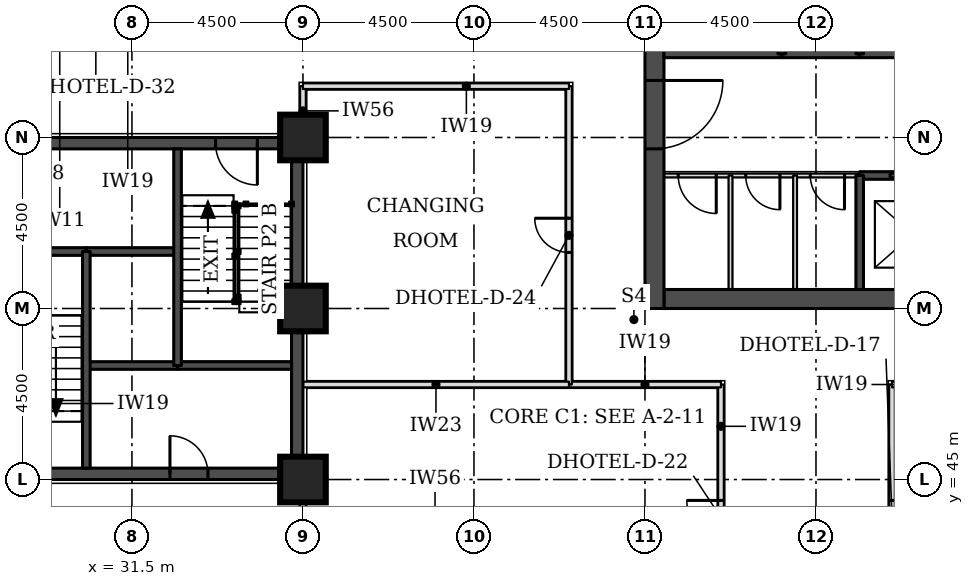
"""IFC4 building model, lengths in metres.
Left out: names, types, materials, properties, quantities, classifications, styles, units other than length and angle.
Written with IfcOpenShell. Run it as: python <this file> out.ifc"""

import sys

from ifc_helpers import new_model, si_unit, direction, frame, frame_2d, origin, origin_2d, place, context, subcontext, project, spatial, rectangle, extrude, element, fill, save


model = new_model("IFC4")
c1 = context("Model", 3, precision=1e-05, world=origin(), true_north=direction((0.0, 1.0)))
c2 = subcontext(c1, "Body", "Model", "MODEL_VIEW")
j1 = project(units=[si_unit("LENGTHUNIT", "METRE"), si_unit("PLANEANGLEUNIT", "RADIAN")], contexts=[c1])
p1 = place(None, origin())
s1 = spatial("IfcSite", under=j1, at=p1, CompositionType="ELEMENT")
p2 = place(p1, origin())
s2 = spatial("IfcBuilding", under=s1, at=p2, CompositionType="ELEMENT")
p3 = place(p2, frame((0.0, 0.0, 36.3)))
s3 = spatial("IfcBuildingStorey", under=s2, at=p3, CompositionType="ELEMENT", Elevation=36.3)
for number, where, z_axis, x_axis in (
    (1, (36.0, 45.0, 0.0), (0.0, 0.0, 1.0), (1.0, 0.0, 0.0)),
    (2, (36.0, 49.5, 0.0), (0.0, 0.0, 1.0), (1.0, 0.0, 0.0)),
    (3, (36.0, 54.0, 0.0), (0.0, 0.0, 1.0), (1.0, 0.0, 0.0)),
):
    element("IfcColumn", number, at=place(p3, frame(where, z_axis=z_axis, x_axis=x_axis)), inside=s3, PredefinedType="COLUMN", context=c2, shape_type="SweptSolid", body=[
        extrude(rectangle(XDim=1.2, YDim=1.2, at=origin_2d()), origin(), (0.0, 0.0, 1.0), 3.3),
    ])
p4 = place(p3, frame((45.5, 49.75, 0.0), z_axis=(0.0, 0.0, 1.0), x_axis=(1.0, 0.0, 0.0)))
e4 = element("IfcWall", 4, at=p4, inside=s3, PredefinedType="SHEAR", context=c2, shape_type="SweptSolid", body=[
    extrude(rectangle(XDim=21.5, YDim=0.5, at=frame_2d((10.75, 0.0))), origin(), (0.0, 0.0, 1.0), 3.3),
])
p5 = place(p3, frame((45.25, 49.5, 0.0), z_axis=(0.0, 0.0, 1.0), x_axis=(0.0, 1.0, 0.0)))
e5 = element("IfcWall", 5, at=p5, inside=s3, PredefinedType="SHEAR", context=c2, shape_type="SweptSolid", body=[
    extrude(rectangle(XDim=22.5, YDim=0.5, at=frame_2d((11.25, 0.0))), origin(), (0.0, 0.0, 1.0), 3.3),
])
p6 = place(p5, frame((4.2, 0.0, 0.0)))
e6 = element("IfcOpeningElement", 6, at=p6, cuts=e5, PredefinedType="OPENING", context=c2, shape_type="SweptSolid", body=[
    extrude(rectangle(XDim=1.8, YDim=2.1, at=frame_2d((0.9, 1.05))), frame((0.0, 0.26, 0.0), z_axis=(0.0, -1.0, 0.0), x_axis=(1.0, 0.0, 0.0)), (0.0, 0.0, 1.0), 0.52),
])
p7 = place(p5, frame((6.9, 0.0, 0.0)))
e7 = element("IfcOpeningElement", 7, at=p7, cuts=e5, PredefinedType="OPENING", context=c2, shape_type="SweptSolid", body=[
    extrude(rectangle(XDim=1.1, YDim=2.1, at=frame_2d((0.55, 1.05))), frame((0.0, 0.26, 0.0), z_axis=(0.0, -1.0, 0.0), x_axis=(1.0, 0.0, 0.0)), (0.0, 0.0, 1.0), 0.52),
])
p8 = place(p5, frame((13.6, 0.0, 0.0)))
e8 = element("IfcOpeningElement", 8, at=p8, cuts=e5, PredefinedType="OPENING", context=c2, shape_type="SweptSolid", body=[
    extrude(rectangle(XDim=1.1, YDim=2.1, at=frame_2d((0.55, 1.05))), frame((0.0, 0.26, 0.0), z_axis=(0.0, -1.0, 0.0), x_axis=(1.0, 0.0, 0.0)), (0.0, 0.0, 1.0), 0.52),
])
p9 = place(p5, frame((16.5, 0.0, 0.0)))
e9 = element("IfcOpeningElement", 9, at=p9, cuts=e5, PredefinedType="OPENING", context=c2, shape_type="SweptSolid", body=[
    extrude(rectangle(XDim=1.8, YDim=2.1, at=frame_2d((0.9, 1.05))), frame((0.0, 0.26, 0.0), z_axis=(0.0, -1.0, 0.0), x_axis=(1.0, 0.0, 0.0)), (0.0, 0.0, 1.0), 0.52),
])
p10 = place(p3, frame((27.3, 45.15, 0.0), z_axis=(0.0, 0.0, 1.0), x_axis=(1.0, 0.0, 0.0)))
e10 = element("IfcWall", 10, at=p10, inside=s3, PredefinedType="SHEAR", context=c2, shape_type="SweptSolid", body=[
    extrude(rectangle(XDim=8.4, YDim=0.3, at=frame_2d((4.2, 0.0))), origin(), (0.0, 0.0, 1.0), 3.3),
])
p11 = place(p10, frame((5.2, 0.0, 0.0)))
e11 = element("IfcOpeningElement", 11, at=p11, cuts=e10, PredefinedType="OPENING", context=c2, shape_type="SweptSolid", body=[
    extrude(rectangle(XDim=1.0, YDim=2.1, at=frame_2d((0.5, 1.05))), frame((0.0, 0.16, 0.0), z_axis=(0.0, -1.0, 0.0), x_axis=(1.0, 0.0, 0.0)), (0.0, 0.0, 1.0), 0.32),
])
p12 = place(p3, frame((27.3, 53.85, 0.0), z_axis=(0.0, 0.0, 1.0), x_axis=(1.0, 0.0, 0.0)))
e12 = element("IfcWall", 12, at=p12, inside=s3, PredefinedType="SHEAR", context=c2, shape_type="SweptSolid", body=[
    extrude(rectangle(XDim=8.4, YDim=0.3, at=frame_2d((4.2, 0.0))), origin(), (0.0, 0.0, 1.0), 3.3),
])
p13 = place(p12, frame((6.4, 0.0, 0.0)))
e13 = element("IfcOpeningElement", 13, at=p13, cuts=e12, PredefinedType="OPENING", context=c2, shape_type="SweptSolid", body=[
    extrude(rectangle(XDim=1.1, YDim=2.1, at=frame_2d((0.55, 1.05))), frame((0.0, 0.16, 0.0), z_axis=(0.0, -1.0, 0.0), x_axis=(1.0, 0.0, 0.0)), (0.0, 0.0, 1.0), 0.32),
])
p14 = place(p3, frame((35.85, 45.0, 0.0), z_axis=(0.0, 0.0, 1.0), x_axis=(0.0, 1.0, 0.0)))
e14 = element("IfcWall", 14, at=p14, inside=s3, PredefinedType="SHEAR", context=c2, shape_type="SweptSolid", body=[
    extrude(rectangle(XDim=9.0, YDim=0.3, at=frame_2d((4.5, 0.0))), origin(), (0.0, 0.0, 1.0), 3.3),
])
p15 = place(p3, frame((51.5, 25.15, 0.0), z_axis=(0.0, 0.0, 1.0), x_axis=(0.0, 1.0, 0.0)))
e15 = element("IfcWall", 15, at=p15, inside=s3, PredefinedType="PARTITIONING", context=c2, shape_type="SweptSolid", body=[
    extrude(rectangle(XDim=22.35, YDim=0.15, at=frame_2d((11.175, 0.0))), origin(), (0.0, 0.0, 1.0), 3.08),
])
p16 = place(p15, frame((0.347, 0.0, 0.0)))
e16 = element("IfcOpeningElement", 16, at=p16, cuts=e15, PredefinedType="OPENING", context=c2, shape_type="SweptSolid", body=[
    extrude(rectangle(XDim=1.0, YDim=2.1, at=frame_2d((0.5, 1.05))), frame((0.0, 0.085, 0.0), z_axis=(0.0, -1.0, 0.0), x_axis=(1.0, 0.0, 0.0)), (0.0, 0.0, 1.0), 0.17),
])
p17 = place(p15, frame((2.3, 0.0, 0.0)))
e17 = element("IfcOpeningElement", 17, at=p17, cuts=e15, PredefinedType="OPENING", context=c2, shape_type="SweptSolid", body=[
    extrude(rectangle(XDim=1.0, YDim=2.1, at=frame_2d((0.5, 1.05))), frame((0.0, 0.085, 0.0), z_axis=(0.0, -1.0, 0.0), x_axis=(1.0, 0.0, 0.0)), (0.0, 0.0, 1.0), 0.17),
])
p18 = place(p15, frame((9.15, 0.0, 0.0)))
e18 = element("IfcOpeningElement", 18, at=p18, cuts=e15, PredefinedType="OPENING", context=c2, shape_type="SweptSolid", body=[
    extrude(rectangle(XDim=1.0, YDim=2.1, at=frame_2d((0.5, 1.05))), frame((0.0, 0.085, 0.0), z_axis=(0.0, -1.0, 0.0), x_axis=(1.0, 0.0, 0.0)), (0.0, 0.0, 1.0), 0.17),
])
p19 = place(p15, frame((11.3, 0.0, 0.0)))
e19 = element("IfcOpeningElement", 19, at=p19, cuts=e15, PredefinedType="OPENING", context=c2, shape_type="SweptSolid", body=[
    extrude(rectangle(XDim=1.0, YDim=2.1, at=frame_2d((0.5, 1.05))), frame((0.0, 0.085, 0.0), z_axis=(0.0, -1.0, 0.0), x_axis=(1.0, 0.0, 0.0)), (0.0, 0.0, 1.0), 0.17),
])
p20 = place(p15, frame((18.4, 0.0, 0.0)))
e20 = element("IfcOpeningElement", 20, at=p20, cuts=e15, PredefinedType="OPENING", context=c2, shape_type="SweptSolid", body=[
    extrude(rectangle(XDim=0.9, YDim=2.1, at=frame_2d((0.45, 1.05))), frame((0.0, 0.085, 0.0), z_axis=(0.0, -1.0, 0.0), x_axis=(1.0, 0.0, 0.0)), (0.0, 0.0, 1.0), 0.17),
])
p21 = place(p3, frame((36.0, 40.55, 0.0), z_axis=(0.0, 0.0, 1.0), x_axis=(0.0, 1.0, 0.0)))
e21 = element("IfcWall", 21, at=p21, inside=s3, PredefinedType="PARTITIONING", context=c2, shape_type="SweptSolid", body=[
    extrude(rectangle(XDim=4.4, YDim=0.15, at=frame_2d((2.2, 0.0))), origin(), (0.0, 0.0, 1.0), 2.33),
])
p22 = place(p3, frame((47.0, 40.5, 0.0), z_axis=(0.0, 0.0, 1.0), x_axis=(0.0, 1.0, 0.0)))
e22 = element("IfcWall", 22, at=p22, inside=s3, PredefinedType="PARTITIONING", context=c2, shape_type="SweptSolid", body=[
    extrude(rectangle(XDim=7.0, YDim=0.15, at=frame_2d((3.5, 0.0))), origin(), (0.0, 0.0, 1.0), 3.08),
])
p23 = place(p22, frame((3.05, 0.0, 0.0)))
e23 = element("IfcOpeningElement", 23, at=p23, cuts=e22, PredefinedType="OPENING", context=c2, shape_type="SweptSolid", body=[
    extrude(rectangle(XDim=0.9, YDim=2.1, at=frame_2d((0.45, 1.05))), frame((0.0, 0.085, 0.0), z_axis=(0.0, -1.0, 0.0), x_axis=(1.0, 0.0, 0.0)), (0.0, 0.0, 1.0), 0.17),
])
p24 = place(p3, frame((43.0, 47.5, 0.0), z_axis=(0.0, 0.0, 1.0), x_axis=(1.0, 0.0, 0.0)))
e24 = element("IfcWall", 24, at=p24, inside=s3, PredefinedType="PARTITIONING", context=c2, shape_type="SweptSolid", body=[
    extrude(rectangle(XDim=4.0, YDim=0.15, at=frame_2d((2.0, 0.0))), origin(), (0.0, 0.0, 1.0), 3.08),
])
p25 = place(p3, frame((43.0, 47.5, 0.0), z_axis=(0.0, 0.0, 1.0), x_axis=(0.0, 1.0, 0.0)))
e25 = element("IfcWall", 25, at=p25, inside=s3, PredefinedType="PARTITIONING", context=c2, shape_type="SweptSolid", body=[
    extrude(rectangle(XDim=7.85, YDim=0.15, at=frame_2d((3.925, 0.0))), origin(), (0.0, 0.0, 1.0), 3.08),
])
p26 = place(p25, frame((3.475, 0.0, 0.0)))
e26 = element("IfcOpeningElement", 26, at=p26, cuts=e25, PredefinedType="OPENING", context=c2, shape_type="SweptSolid", body=[
    extrude(rectangle(XDim=0.9, YDim=2.1, at=frame_2d((0.45, 1.05))), frame((0.0, 0.085, 0.0), z_axis=(0.0, -1.0, 0.0), x_axis=(1.0, 0.0, 0.0)), (0.0, 0.0, 1.0), 0.17),
])
p27 = place(p3, frame((51.5, 47.5, 0.0), z_axis=(0.0, 0.0, 1.0), x_axis=(1.0, 0.0, 0.0)))
e27 = element("IfcWall", 27, at=p27, inside=s3, PredefinedType="PARTITIONING", context=c2, shape_type="SweptSolid", body=[
    extrude(rectangle(XDim=18.0, YDim=0.15, at=frame_2d((9.0, 0.0))), origin(), (0.0, 0.0, 1.0), 3.08),
])
p28 = place(p27, frame((12.2, 0.0, 0.0)))
e28 = element("IfcOpeningElement", 28, at=p28, cuts=e27, PredefinedType="OPENING", context=c2, shape_type="SweptSolid", body=[
    extrude(rectangle(XDim=1.0, YDim=2.1, at=frame_2d((0.5, 1.05))), frame((0.0, 0.085, 0.0), z_axis=(0.0, -1.0, 0.0), x_axis=(1.0, 0.0, 0.0)), (0.0, 0.0, 1.0), 0.17),
])
p29 = place(p27, frame((10.05, 0.0, 0.0)))
e29 = element("IfcOpeningElement", 29, at=p29, cuts=e27, PredefinedType="OPENING", context=c2, shape_type="SweptSolid", body=[
    extrude(rectangle(XDim=1.0, YDim=2.1, at=frame_2d((0.5, 1.05))), frame((0.0, 0.085, 0.0), z_axis=(0.0, -1.0, 0.0), x_axis=(1.0, 0.0, 0.0)), (0.0, 0.0, 1.0), 0.17),
])
p30 = place(p27, frame((16.5, 0.0, 0.0)))
e30 = element("IfcOpeningElement", 30, at=p30, cuts=e27, PredefinedType="OPENING", context=c2, shape_type="SweptSolid", body=[
    extrude(rectangle(XDim=1.0, YDim=2.1, at=frame_2d((0.5, 1.05))), frame((0.0, 0.085, 0.0), z_axis=(0.0, -1.0, 0.0), x_axis=(1.0, 0.0, 0.0)), (0.0, 0.0, 1.0), 0.17),
])
p31 = place(p3, frame((36.0, 54.05, 0.0), z_axis=(0.0, 0.0, 1.0), x_axis=(0.0, 1.0, 0.0)))
e31 = element("IfcWall", 31, at=p31, inside=s3, PredefinedType="PARTITIONING", context=c2, shape_type="SweptSolid", body=[
    extrude(rectangle(XDim=1.3, YDim=0.15, at=frame_2d((0.65, 0.0))), origin(), (0.0, 0.0, 1.0), 2.33),
])
for number, where, z_axis, x_axis in (
    (32, (36.0, 55.35, 0.0), (0.0, 0.0, 1.0), (1.0, 0.0, 0.0)),
    (33, (36.0, 47.5, 0.0), (0.0, 0.0, 1.0), (1.0, 0.0, 0.0)),
):
    element("IfcWall", number, at=place(p3, frame(where, z_axis=z_axis, x_axis=x_axis)), inside=s3, PredefinedType="PARTITIONING", context=c2, shape_type="SweptSolid", body=[
        extrude(rectangle(XDim=7.0, YDim=0.15, at=frame_2d((3.5, 0.0))), origin(), (0.0, 0.0, 1.0), 3.08),
    ])
p32 = place(p3, frame((45.5, 53.0, 0.0), z_axis=(0.0, 0.0, 1.0), x_axis=(1.0, 0.0, 0.0)))
e34 = element("IfcWall", 34, at=p32, inside=s3, PredefinedType="PARTITIONING", context=c2, shape_type="SweptSolid", body=[
    extrude(rectangle(XDim=5.15, YDim=0.1, at=frame_2d((2.575, 0.0))), origin(), (0.0, 0.0, 1.0), 3.08),
])
p33 = place(p32, frame((0.375, 0.0, 0.0)))
e35 = element("IfcOpeningElement", 35, at=p33, cuts=e34, PredefinedType="OPENING", context=c2, shape_type="SweptSolid", body=[
    extrude(rectangle(XDim=1.0, YDim=2.1, at=frame_2d((0.5, 1.05))), frame((0.0, 0.06, 0.0), z_axis=(0.0, -1.0, 0.0), x_axis=(1.0, 0.0, 0.0)), (0.0, 0.0, 1.0), 0.12),
])
p34 = place(p32, frame((2.151, 0.0, 0.0)))
e36 = element("IfcOpeningElement", 36, at=p34, cuts=e34, PredefinedType="OPENING", context=c2, shape_type="SweptSolid", body=[
    extrude(rectangle(XDim=0.9, YDim=2.1, at=frame_2d((0.45, 1.05))), frame((0.0, 0.06, 0.0), z_axis=(0.0, -1.0, 0.0), x_axis=(1.0, 0.0, 0.0)), (0.0, 0.0, 1.0), 0.12),
])
p35 = place(p32, frame((3.85, 0.0, 0.0)))
e37 = element("IfcOpeningElement", 37, at=p35, cuts=e34, PredefinedType="OPENING", context=c2, shape_type="SweptSolid", body=[
    extrude(rectangle(XDim=0.9, YDim=2.1, at=frame_2d((0.45, 1.05))), frame((0.0, 0.06, 0.0), z_axis=(0.0, -1.0, 0.0), x_axis=(1.0, 0.0, 0.0)), (0.0, 0.0, 1.0), 0.12),
])
p36 = place(p3, frame((50.65, 53.0, 0.0), z_axis=(0.0, 0.0, 1.0), x_axis=(1.0, 0.0, 0.0)))
e38 = element("IfcWall", 38, at=p36, inside=s3, PredefinedType="SOLIDWALL", context=c2, shape_type="SweptSolid", body=[
    extrude(rectangle(XDim=11.2, YDim=0.2, at=frame_2d((5.6, 0.0))), origin(), (0.0, 0.0, 1.0), 3.08),
])
p37 = place(p36, frame((0.8, 0.0, 0.0)))
e39 = element("IfcOpeningElement", 39, at=p37, cuts=e38, PredefinedType="OPENING", context=c2, shape_type="SweptSolid", body=[
    extrude(rectangle(XDim=1.2, YDim=2.1, at=frame_2d((0.6, 1.05))), frame((0.0, 0.11, 0.0), z_axis=(0.0, -1.0, 0.0), x_axis=(1.0, 0.0, 0.0)), (0.0, 0.0, 1.0), 0.22),
])
p38 = place(p36, frame((3.6, 0.0, 0.0)))
e40 = element("IfcOpeningElement", 40, at=p38, cuts=e38, PredefinedType="OPENING", context=c2, shape_type="SweptSolid", body=[
    extrude(rectangle(XDim=1.2, YDim=2.1, at=frame_2d((0.6, 1.05))), frame((0.0, 0.11, 0.0), z_axis=(0.0, -1.0, 0.0), x_axis=(1.0, 0.0, 0.0)), (0.0, 0.0, 1.0), 0.22),
])
p39 = place(p36, frame((6.4, 0.0, 0.0)))
e41 = element("IfcOpeningElement", 41, at=p39, cuts=e38, PredefinedType="OPENING", context=c2, shape_type="SweptSolid", body=[
    extrude(rectangle(XDim=1.2, YDim=2.1, at=frame_2d((0.6, 1.05))), frame((0.0, 0.11, 0.0), z_axis=(0.0, -1.0, 0.0), x_axis=(1.0, 0.0, 0.0)), (0.0, 0.0, 1.0), 0.22),
])
p40 = place(p36, frame((9.2, 0.0, 0.0)))
e42 = element("IfcOpeningElement", 42, at=p40, cuts=e38, PredefinedType="OPENING", context=c2, shape_type="SweptSolid", body=[
    extrude(rectangle(XDim=1.2, YDim=2.1, at=frame_2d((0.6, 1.05))), frame((0.0, 0.11, 0.0), z_axis=(0.0, -1.0, 0.0), x_axis=(1.0, 0.0, 0.0)), (0.0, 0.0, 1.0), 0.22),
])
p41 = place(p3, frame((48.6, 56.2, 0.0), z_axis=(0.0, 0.0, 1.0), x_axis=(1.0, 0.0, 0.0)))
e43 = element("IfcWall", 43, at=p41, inside=s3, PredefinedType="SOLIDWALL", context=c2, shape_type="SweptSolid", body=[
    extrude(rectangle(XDim=2.05, YDim=0.2, at=frame_2d((1.025, 0.0))), origin(), (0.0, 0.0, 1.0), 3.08),
])
p42 = place(p3, frame((45.5, 56.2, 0.0), z_axis=(0.0, 0.0, 1.0), x_axis=(1.0, 0.0, 0.0)))
e44 = element("IfcWall", 44, at=p42, inside=s3, PredefinedType="SOLIDWALL", context=c2, shape_type="SweptSolid", body=[
    extrude(rectangle(XDim=3.1, YDim=0.2, at=frame_2d((1.55, 0.0))), origin(), (0.0, 0.0, 1.0), 3.08),
])
p43 = place(p3, frame((50.65, 56.2, 0.0), z_axis=(0.0, 0.0, 1.0), x_axis=(1.0, 0.0, 0.0)))
e45 = element("IfcWall", 45, at=p43, inside=s3, PredefinedType="SOLIDWALL", context=c2, shape_type="SweptSolid", body=[
    extrude(rectangle(XDim=11.2, YDim=0.2, at=frame_2d((5.6, 0.0))), origin(), (0.0, 0.0, 1.0), 3.08),
])
p44 = place(p3, frame((47.251, 50.0, 0.0), z_axis=(0.0, 0.0, 1.0), x_axis=(0.0, 1.0, 0.0)))
e46 = element("IfcWall", 46, at=p44, inside=s3, PredefinedType="PARTITIONING", context=c2, shape_type="SweptSolid", body=[
    extrude(rectangle(XDim=3.0, YDim=0.1, at=frame_2d((1.5, 0.0))), origin(), (0.0, 0.0, 1.0), 3.08),
])
p45 = place(p3, frame((48.6, 56.2, 0.0), z_axis=(0.0, 0.0, 1.0), x_axis=(0.0, 1.0, 0.0)))
e47 = element("IfcWall", 47, at=p45, inside=s3, PredefinedType="SOLIDWALL", context=c2, shape_type="SweptSolid", body=[
    extrude(rectangle(XDim=5.8, YDim=0.2, at=frame_2d((2.9, 0.0))), origin(), (0.0, 0.0, 1.0), 3.08),
])
p46 = place(p3, frame((48.95, 50.0, 0.0), z_axis=(0.0, 0.0, 1.0), x_axis=(0.0, 1.0, 0.0)))
e48 = element("IfcWall", 48, at=p46, inside=s3, PredefinedType="PARTITIONING", context=c2, shape_type="SweptSolid", body=[
    extrude(rectangle(XDim=3.0, YDim=0.1, at=frame_2d((1.5, 0.0))), origin(), (0.0, 0.0, 1.0), 3.08),
])
p47 = place(p3, frame((50.65, 50.0, 0.0), z_axis=(0.0, 0.0, 1.0), x_axis=(0.0, 1.0, 0.0)))
e49 = element("IfcWall", 49, at=p47, inside=s3, PredefinedType="SOLIDWALL", context=c2, shape_type="SweptSolid", body=[
    extrude(rectangle(XDim=3.0, YDim=0.2, at=frame_2d((1.5, 0.0))), origin(), (0.0, 0.0, 1.0), 3.08),
])
p48 = place(p3, frame((50.65, 56.2, 0.0), z_axis=(0.0, 0.0, 1.0), x_axis=(0.0, 1.0, 0.0)))
e50 = element("IfcWall", 50, at=p48, inside=s3, PredefinedType="SOLIDWALL", context=c2, shape_type="SweptSolid", body=[
    extrude(rectangle(XDim=2.8, YDim=0.2, at=frame_2d((1.4, 0.0))), origin(), (0.0, 0.0, 1.0), 3.08),
])
p49 = place(p3, frame((30.3, 48.0, 0.0), z_axis=(0.0, 0.0, 1.0), x_axis=(1.0, 0.0, 0.0)))
e51 = element("IfcWall", 51, at=p49, inside=s3, PredefinedType="SOLIDWALL", context=c2, shape_type="SweptSolid", body=[
    extrude(rectangle(XDim=2.4, YDim=0.2, at=frame_2d((1.2, 0.0))), origin(), (0.0, 0.0, 1.0), 3.08),
])
p50 = place(p3, frame((32.7, 48.0, 0.0), z_axis=(0.0, 0.0, 1.0), x_axis=(1.0, 0.0, 0.0)))
e52 = element("IfcWall", 52, at=p50, inside=s3, PredefinedType="SOLIDWALL", context=c2, shape_type="SweptSolid", body=[
    extrude(rectangle(XDim=3.0, YDim=0.2, at=frame_2d((1.5, 0.0))), origin(), (0.0, 0.0, 1.0), 3.08),
])
p51 = place(p3, frame((30.3, 51.0, 0.0), z_axis=(0.0, 0.0, 1.0), x_axis=(1.0, 0.0, 0.0)))
e53 = element("IfcWall", 53, at=p51, inside=s3, PredefinedType="SOLIDWALL", context=c2, shape_type="SweptSolid", body=[
    extrude(rectangle(XDim=2.4, YDim=0.2, at=frame_2d((1.2, 0.0))), origin(), (0.0, 0.0, 1.0), 3.3),
])
p52 = place(p3, frame((27.3, 51.0, 0.0), z_axis=(0.0, 0.0, 1.0), x_axis=(1.0, 0.0, 0.0)))
e54 = element("IfcWall", 54, at=p52, inside=s3, PredefinedType="SOLIDWALL", context=c2, shape_type="SweptSolid", body=[
    extrude(rectangle(XDim=3.0, YDim=0.2, at=frame_2d((1.5, 0.0))), origin(), (0.0, 0.0, 1.0), 3.08),
])
for number, where, z_axis, x_axis in (
    (55, (30.3, 45.3, 0.0), (0.0, 0.0, 1.0), (0.0, 1.0, 0.0)),
    (56, (32.7, 48.0, 0.0), (0.0, 0.0, 1.0), (0.0, 1.0, 0.0)),
):
    element("IfcWall", number, at=place(p3, frame(where, z_axis=z_axis, x_axis=x_axis)), inside=s3, PredefinedType="SOLIDWALL", context=c2, shape_type="SweptSolid", body=[
        extrude(rectangle(XDim=5.7, YDim=0.2, at=frame_2d((2.85, 0.0))), origin(), (0.0, 0.0, 1.0), 3.08),
    ])
p53 = place(p26, origin())
e57 = element("IfcDoor", 57, at=p53, inside=s3, OperationType="SINGLE_SWING_RIGHT", PredefinedType="DOOR", context=c2, shape_type="SweptSolid", body=[
    extrude(rectangle(XDim=0.9, YDim=2.1, at=frame_2d((0.45, 1.05))), frame((0.0, 0.025, 0.0), z_axis=(0.0, -1.0, 0.0), x_axis=(1.0, 0.0, 0.0)), (0.0, 0.0, 1.0), 0.05),
])
fill(e26, e57)
p54 = place(p23, origin())
e58 = element("IfcDoor", 58, at=p54, inside=s3, OperationType="SINGLE_SWING_RIGHT", PredefinedType="DOOR", context=c2, shape_type="SweptSolid", body=[
    extrude(rectangle(XDim=0.9, YDim=2.1, at=frame_2d((0.45, 1.05))), frame((0.0, 0.025, 0.0), z_axis=(0.0, -1.0, 0.0), x_axis=(1.0, 0.0, 0.0)), (0.0, 0.0, 1.0), 0.05),
])
fill(e23, e58)
p55 = place(p20, frame((0.9, 0.0, 0.0), z_axis=(0.0, 0.0, 1.0), x_axis=(-1.0, 0.0, 0.0)))
e59 = element("IfcDoor", 59, at=p55, inside=s3, OperationType="SINGLE_SWING_LEFT", PredefinedType="DOOR", context=c2, shape_type="SweptSolid", body=[
    extrude(rectangle(XDim=0.9, YDim=2.1, at=frame_2d((0.45, 1.05))), frame((0.0, 0.025, 0.0), z_axis=(0.0, -1.0, 0.0), x_axis=(1.0, 0.0, 0.0)), (0.0, 0.0, 1.0), 0.05),
])
fill(e20, e59)
p56 = place(p37, origin())
e60 = element("IfcDoor", 60, at=p56, inside=s3, OperationType="DOUBLE_DOOR_SLIDING", PredefinedType="DOOR", context=c2, shape_type="SweptSolid", body=[
    extrude(rectangle(XDim=1.2, YDim=2.1, at=frame_2d((0.6, 1.05))), frame((0.0, 0.025, 0.0), z_axis=(0.0, -1.0, 0.0), x_axis=(1.0, 0.0, 0.0)), (0.0, 0.0, 1.0), 0.05),
])
fill(e39, e60)
p57 = place(p6, frame((1.8, 0.0, 0.0), z_axis=(0.0, 0.0, 1.0), x_axis=(-1.0, 0.0, 0.0)))
e61 = element("IfcDoor", 61, at=p57, inside=s3, OperationType="SINGLE_SWING_LEFT", PredefinedType="DOOR", context=c2, shape_type="SweptSolid", body=[
    extrude(rectangle(XDim=1.8, YDim=2.1, at=frame_2d((0.9, 1.05))), frame((0.0, 0.025, 0.0), z_axis=(0.0, -1.0, 0.0), x_axis=(1.0, 0.0, 0.0)), (0.0, 0.0, 1.0), 0.05),
])
fill(e6, e61)
p58 = place(p33, frame((1.0, 0.0, 0.0), z_axis=(0.0, 0.0, 1.0), x_axis=(-1.0, 0.0, 0.0)))
e62 = element("IfcDoor", 62, at=p58, inside=s3, OperationType="SINGLE_SWING_LEFT", PredefinedType="DOOR", context=c2, shape_type="SweptSolid", body=[
    extrude(rectangle(XDim=1.0, YDim=2.1, at=frame_2d((0.5, 1.05))), frame((0.0, 0.025, 0.0), z_axis=(0.0, -1.0, 0.0), x_axis=(1.0, 0.0, 0.0)), (0.0, 0.0, 1.0), 0.05),
])
fill(e35, e62)
p59 = place(p34, frame((0.9, 0.0, 0.0), z_axis=(0.0, 0.0, 1.0), x_axis=(-1.0, 0.0, 0.0)))
e63 = element("IfcDoor", 63, at=p59, inside=s3, OperationType="SINGLE_SWING_LEFT", PredefinedType="DOOR", context=c2, shape_type="SweptSolid", body=[
    extrude(rectangle(XDim=0.9, YDim=2.1, at=frame_2d((0.45, 1.05))), frame((0.0, 0.025, 0.0), z_axis=(0.0, -1.0, 0.0), x_axis=(1.0, 0.0, 0.0)), (0.0, 0.0, 1.0), 0.05),
])
fill(e36, e63)
p60 = place(p35, frame((0.9, 0.0, 0.0), z_axis=(0.0, 0.0, 1.0), x_axis=(-1.0, 0.0, 0.0)))
e64 = element("IfcDoor", 64, at=p60, inside=s3, OperationType="SINGLE_SWING_LEFT", PredefinedType="DOOR", context=c2, shape_type="SweptSolid", body=[
    extrude(rectangle(XDim=0.9, YDim=2.1, at=frame_2d((0.45, 1.05))), frame((0.0, 0.025, 0.0), z_axis=(0.0, -1.0, 0.0), x_axis=(1.0, 0.0, 0.0)), (0.0, 0.0, 1.0), 0.05),
])
fill(e37, e64)
p61 = place(p13, frame((1.1, 0.0, 0.0), z_axis=(0.0, 0.0, 1.0), x_axis=(-1.0, 0.0, 0.0)))
e65 = element("IfcDoor", 65, at=p61, inside=s3, OperationType="SINGLE_SWING_LEFT", PredefinedType="DOOR", context=c2, shape_type="SweptSolid", body=[
    extrude(rectangle(XDim=1.1, YDim=2.1, at=frame_2d((0.55, 1.05))), frame((0.0, 0.025, 0.0), z_axis=(0.0, -1.0, 0.0), x_axis=(1.0, 0.0, 0.0)), (0.0, 0.0, 1.0), 0.05),
])
fill(e13, e65)
p62 = place(p11, origin())
e66 = element("IfcDoor", 66, at=p62, inside=s3, OperationType="SINGLE_SWING_LEFT", PredefinedType="DOOR", context=c2, shape_type="SweptSolid", body=[
    extrude(rectangle(XDim=1.0, YDim=2.1, at=frame_2d((0.5, 1.05))), frame((0.0, 0.025, 0.0), z_axis=(0.0, -1.0, 0.0), x_axis=(1.0, 0.0, 0.0)), (0.0, 0.0, 1.0), 0.05),
])
fill(e11, e66)
save(model, sys.argv[1])
